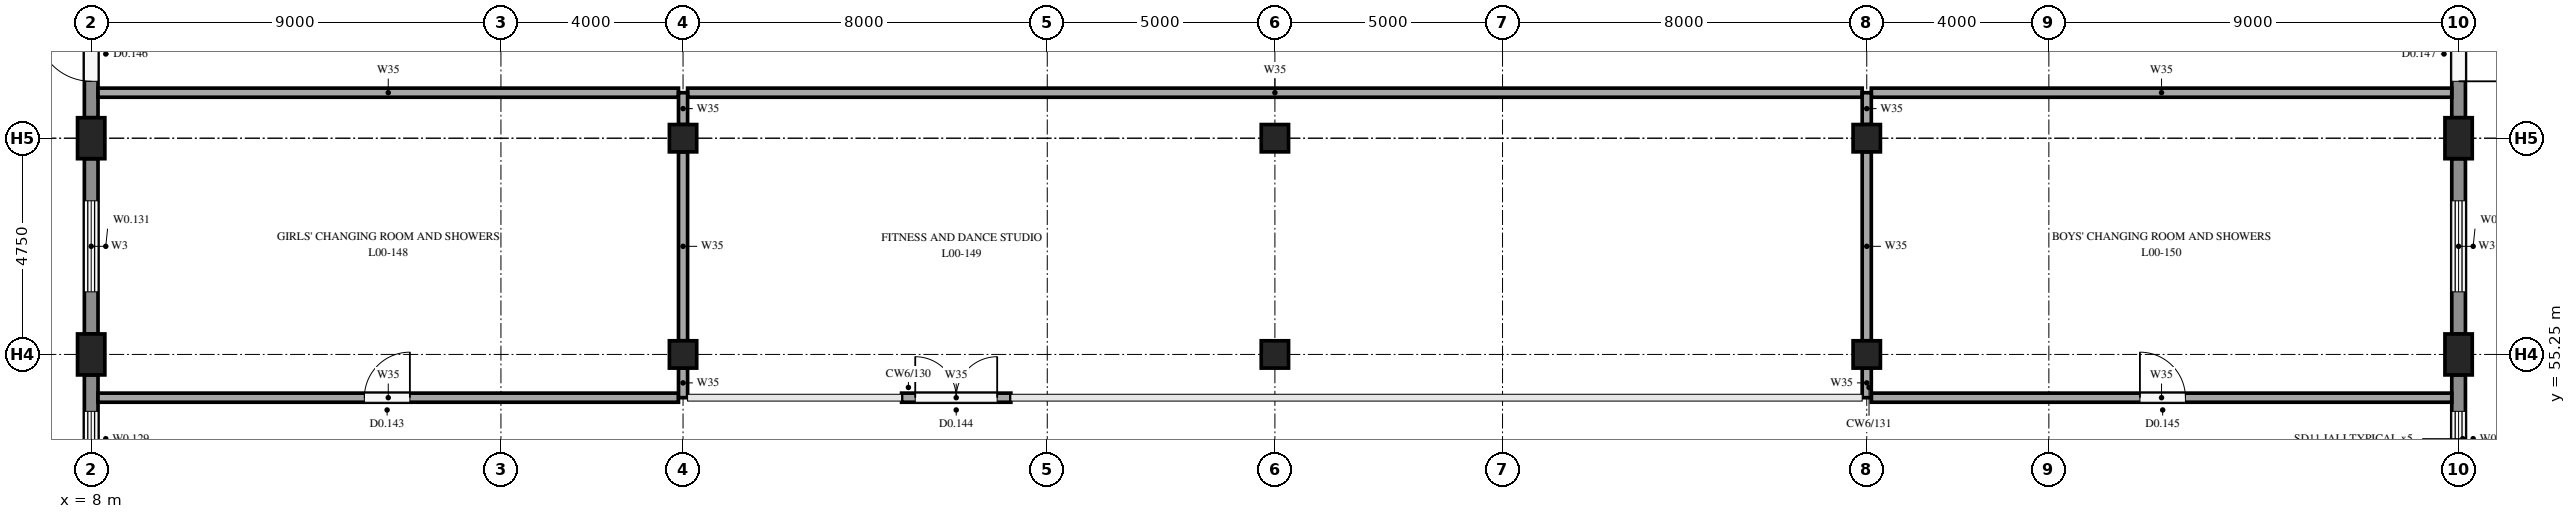
"""IFC4 building model, lengths in metres.
Left out: names, types, materials, properties, quantities, classifications, styles, units other than length and angle.
Written with IfcOpenShell. Run it as: python <this file> out.ifc"""

import sys

from ifc_helpers import new_model, si_unit, direction, frame, frame_2d, origin, origin_2d, place, context, subcontext, project, spatial, rectangle, extrude, element, fill, save


model = new_model("IFC4")
c1 = context("Model", 3, precision=1e-05, world=origin(), true_north=direction((0.0, 1.0)))
c2 = subcontext(c1, "Body", "Model", "MODEL_VIEW")
j1 = project(units=[si_unit("LENGTHUNIT", "METRE"), si_unit("PLANEANGLEUNIT", "RADIAN")], contexts=[c1])
p1 = place(None, origin())
s1 = spatial("IfcSite", under=j1, at=p1, CompositionType="ELEMENT")
p2 = place(p1, origin())
s2 = spatial("IfcBuilding", under=s1, at=p2, CompositionType="ELEMENT")
p3 = place(p2, origin())
s3 = spatial("IfcBuildingStorey", under=s2, at=p3, CompositionType="ELEMENT", Elevation=0.0)
for number, where, z_axis, x_axis in (
    (1, (8.0, 55.25, 0.0), (0.0, 0.0, 1.0), (1.0, 0.0, 0.0)),
    (2, (8.0, 60.0, 0.0), (0.0, 0.0, 1.0), (1.0, 0.0, 0.0)),
    (3, (60.0, 55.25, 0.0), (0.0, 0.0, 1.0), (1.0, 0.0, 0.0)),
    (4, (60.0, 60.0, 0.0), (0.0, 0.0, 1.0), (1.0, 0.0, 0.0)),
):
    element("IfcColumn", number, at=place(p3, frame(where, z_axis=z_axis, x_axis=x_axis)), inside=s3, PredefinedType="COLUMN", context=c2, shape_type="SweptSolid", body=[
        extrude(rectangle(XDim=0.6, YDim=0.9, at=origin_2d()), origin(), (0.0, 0.0, 1.0), 4.5),
    ])
for number, where, z_axis, x_axis in (
    (5, (21.0, 55.25, 0.0), (0.0, 0.0, 1.0), (1.0, 0.0, 0.0)),
    (6, (21.0, 60.0, 0.0), (0.0, 0.0, 1.0), (1.0, 0.0, 0.0)),
    (7, (34.0, 55.25, 0.0), (0.0, 0.0, 1.0), (1.0, 0.0, 0.0)),
    (8, (34.0, 60.0, 0.0), (0.0, 0.0, 1.0), (1.0, 0.0, 0.0)),
    (9, (47.0, 55.25, 0.0), (0.0, 0.0, 1.0), (1.0, 0.0, 0.0)),
    (10, (47.0, 60.0, 0.0), (0.0, 0.0, 1.0), (1.0, 0.0, 0.0)),
):
    element("IfcColumn", number, at=place(p3, frame(where, z_axis=z_axis, x_axis=x_axis)), inside=s3, PredefinedType="COLUMN", context=c2, shape_type="SweptSolid", body=[
        extrude(rectangle(XDim=0.6, YDim=0.6, at=origin_2d()), origin(), (0.0, 0.0, 1.0), 4.5),
    ])
p4 = place(p3, frame((8.0, 50.95, 0.0), z_axis=(0.0, 0.0, 1.0), x_axis=(0.0, 1.0, 0.0)))
e11 = element("IfcWall", 11, at=p4, inside=s3, PredefinedType="SOLIDWALL", context=c2, shape_type="SweptSolid", body=[
    extrude(rectangle(XDim=3.85, YDim=0.3, at=frame_2d((1.925, 0.0))), origin(), (0.0, 0.0, 1.0), 4.15),
])
p5 = place(p4, frame((1.85, 0.0, 1.0)))
e12 = element("IfcOpeningElement", 12, at=p5, cuts=e11, PredefinedType="OPENING", context=c2, shape_type="SweptSolid", body=[
    extrude(rectangle(XDim=1.2, YDim=2.0, at=frame_2d((0.6, 1.0))), frame((0.0, 0.16, 0.0), z_axis=(0.0, -1.0, 0.0), x_axis=(1.0, 0.0, 0.0)), (0.0, 0.0, 1.0), 0.32),
])
p6 = place(p4, frame((0.45, 0.0, 0.0)))
e13 = element("IfcOpeningElement", 13, at=p6, cuts=e11, PredefinedType="OPENING", context=c2, shape_type="SweptSolid", body=[
    extrude(rectangle(XDim=1.2, YDim=2.1, at=frame_2d((0.6, 1.05))), frame((0.0, 0.16, 0.0), z_axis=(0.0, -1.0, 0.0), x_axis=(1.0, 0.0, 0.0)), (0.0, 0.0, 1.0), 0.32),
])
p7 = place(p3, frame((8.0, 55.7, 0.0), z_axis=(0.0, 0.0, 1.0), x_axis=(0.0, 1.0, 0.0)))
e14 = element("IfcWall", 14, at=p7, inside=s3, PredefinedType="SOLIDWALL", context=c2, shape_type="SweptSolid", body=[
    extrude(rectangle(XDim=3.85, YDim=0.3, at=frame_2d((1.925, 0.0))), origin(), (0.0, 0.0, 1.0), 4.15),
])
p8 = place(p7, frame((0.925, 0.0, 1.0)))
e15 = element("IfcOpeningElement", 15, at=p8, cuts=e14, PredefinedType="OPENING", context=c2, shape_type="SweptSolid", body=[
    extrude(rectangle(XDim=2.0, YDim=2.0, at=frame_2d((1.0, 1.0))), frame((0.0, 0.16, 0.0), z_axis=(0.0, -1.0, 0.0), x_axis=(1.0, 0.0, 0.0)), (0.0, 0.0, 1.0), 0.32),
])
p9 = place(p3, frame((8.0, 60.45, 0.0), z_axis=(0.0, 0.0, 1.0), x_axis=(0.0, 1.0, 0.0)))
e16 = element("IfcWall", 16, at=p9, inside=s3, PredefinedType="SOLIDWALL", context=c2, shape_type="SweptSolid", body=[
    extrude(rectangle(XDim=3.85, YDim=0.3, at=frame_2d((1.925, 0.0))), origin(), (0.0, 0.0, 1.0), 4.15),
])
p10 = place(p9, frame((2.1, 0.0, 1.0)))
e17 = element("IfcOpeningElement", 17, at=p10, cuts=e16, PredefinedType="OPENING", context=c2, shape_type="SweptSolid", body=[
    extrude(rectangle(XDim=1.2, YDim=2.0, at=frame_2d((0.6, 1.0))), frame((0.0, 0.16, 0.0), z_axis=(0.0, -1.0, 0.0), x_axis=(1.0, 0.0, 0.0)), (0.0, 0.0, 1.0), 0.32),
])
p11 = place(p9, frame((0.8, 0.0, 0.0)))
e18 = element("IfcOpeningElement", 18, at=p11, cuts=e16, PredefinedType="OPENING", context=c2, shape_type="SweptSolid", body=[
    extrude(rectangle(XDim=1.2, YDim=2.1, at=frame_2d((0.6, 1.05))), frame((0.0, 0.16, 0.0), z_axis=(0.0, -1.0, 0.0), x_axis=(1.0, 0.0, 0.0)), (0.0, 0.0, 1.0), 0.32),
])
p12 = place(p3, frame((60.0, 50.95, 0.0), z_axis=(0.0, 0.0, 1.0), x_axis=(0.0, 1.0, 0.0)))
e19 = element("IfcWall", 19, at=p12, inside=s3, PredefinedType="SOLIDWALL", context=c2, shape_type="SweptSolid", body=[
    extrude(rectangle(XDim=3.85, YDim=0.3, at=frame_2d((1.925, 0.0))), origin(), (0.0, 0.0, 1.0), 4.15),
])
p13 = place(p12, frame((1.85, 0.0, 1.0)))
e20 = element("IfcOpeningElement", 20, at=p13, cuts=e19, PredefinedType="OPENING", context=c2, shape_type="SweptSolid", body=[
    extrude(rectangle(XDim=1.2, YDim=2.0, at=frame_2d((0.6, 1.0))), frame((0.0, 0.16, 0.0), z_axis=(0.0, -1.0, 0.0), x_axis=(1.0, 0.0, 0.0)), (0.0, 0.0, 1.0), 0.32),
])
p14 = place(p12, frame((0.45, 0.0, 0.0)))
e21 = element("IfcOpeningElement", 21, at=p14, cuts=e19, PredefinedType="OPENING", context=c2, shape_type="SweptSolid", body=[
    extrude(rectangle(XDim=1.2, YDim=2.1, at=frame_2d((0.6, 1.05))), frame((0.0, 0.16, 0.0), z_axis=(0.0, -1.0, 0.0), x_axis=(1.0, 0.0, 0.0)), (0.0, 0.0, 1.0), 0.32),
])
p15 = place(p3, frame((60.0, 55.7, 0.0), z_axis=(0.0, 0.0, 1.0), x_axis=(0.0, 1.0, 0.0)))
e22 = element("IfcWall", 22, at=p15, inside=s3, PredefinedType="SOLIDWALL", context=c2, shape_type="SweptSolid", body=[
    extrude(rectangle(XDim=3.85, YDim=0.3, at=frame_2d((1.925, 0.0))), origin(), (0.0, 0.0, 1.0), 4.15),
])
p16 = place(p15, frame((0.925, 0.0, 1.0)))
e23 = element("IfcOpeningElement", 23, at=p16, cuts=e22, PredefinedType="OPENING", context=c2, shape_type="SweptSolid", body=[
    extrude(rectangle(XDim=2.0, YDim=2.0, at=frame_2d((1.0, 1.0))), frame((0.0, 0.16, 0.0), z_axis=(0.0, -1.0, 0.0), x_axis=(1.0, 0.0, 0.0)), (0.0, 0.0, 1.0), 0.32),
])
p17 = place(p3, frame((60.0, 60.45, 0.0), z_axis=(0.0, 0.0, 1.0), x_axis=(0.0, 1.0, 0.0)))
e24 = element("IfcWall", 24, at=p17, inside=s3, PredefinedType="SOLIDWALL", context=c2, shape_type="SweptSolid", body=[
    extrude(rectangle(XDim=3.85, YDim=0.3, at=frame_2d((1.925, 0.0))), origin(), (0.0, 0.0, 1.0), 4.15),
])
p18 = place(p17, frame((2.1, 0.0, 1.0)))
e25 = element("IfcOpeningElement", 25, at=p18, cuts=e24, PredefinedType="OPENING", context=c2, shape_type="SweptSolid", body=[
    extrude(rectangle(XDim=1.2, YDim=2.0, at=frame_2d((0.6, 1.0))), frame((0.0, 0.16, 0.0), z_axis=(0.0, -1.0, 0.0), x_axis=(1.0, 0.0, 0.0)), (0.0, 0.0, 1.0), 0.32),
])
p19 = place(p17, frame((0.8, 0.0, 0.0)))
e26 = element("IfcOpeningElement", 26, at=p19, cuts=e24, PredefinedType="OPENING", context=c2, shape_type="SweptSolid", body=[
    extrude(rectangle(XDim=1.2, YDim=2.1, at=frame_2d((0.6, 1.05))), frame((0.0, 0.16, 0.0), z_axis=(0.0, -1.0, 0.0), x_axis=(1.0, 0.0, 0.0)), (0.0, 0.0, 1.0), 0.32),
])
p20 = place(p3, frame((8.15, 54.3, 0.0), z_axis=(0.0, 0.0, 1.0), x_axis=(1.0, 0.0, 0.0)))
e27 = element("IfcWall", 27, at=p20, inside=s3, PredefinedType="PARTITIONING", context=c2, shape_type="SweptSolid", body=[
    extrude(rectangle(XDim=12.75, YDim=0.2, at=frame_2d((6.375, 0.0))), origin(), (0.0, 0.0, 1.0), 4.15),
])
p21 = place(p20, frame((5.85, 0.0, 0.0)))
e28 = element("IfcOpeningElement", 28, at=p21, cuts=e27, PredefinedType="OPENING", context=c2, shape_type="SweptSolid", body=[
    extrude(rectangle(XDim=1.0, YDim=2.1, at=frame_2d((0.5, 1.05))), frame((0.0, 0.11, 0.0), z_axis=(0.0, -1.0, 0.0), x_axis=(1.0, 0.0, 0.0)), (0.0, 0.0, 1.0), 0.22),
])
p22 = place(p3, frame((25.8, 54.3, 0.0), z_axis=(0.0, 0.0, 1.0), x_axis=(1.0, 0.0, 0.0)))
e29 = element("IfcWall", 29, at=p22, inside=s3, PredefinedType="PARTITIONING", context=c2, shape_type="SweptSolid", body=[
    extrude(rectangle(XDim=2.4, YDim=0.2, at=frame_2d((1.2, 0.0))), origin(), (0.0, 0.0, 1.0), 4.15),
])
p23 = place(p22, frame((0.3, 0.0, 0.0)))
e30 = element("IfcOpeningElement", 30, at=p23, cuts=e29, PredefinedType="OPENING", context=c2, shape_type="SweptSolid", body=[
    extrude(rectangle(XDim=1.8, YDim=2.1, at=frame_2d((0.9, 1.05))), frame((0.0, 0.11, 0.0), z_axis=(0.0, -1.0, 0.0), x_axis=(1.0, 0.0, 0.0)), (0.0, 0.0, 1.0), 0.22),
])
p24 = place(p3, frame((47.1, 54.3, 0.0), z_axis=(0.0, 0.0, 1.0), x_axis=(1.0, 0.0, 0.0)))
e31 = element("IfcWall", 31, at=p24, inside=s3, PredefinedType="PARTITIONING", context=c2, shape_type="SweptSolid", body=[
    extrude(rectangle(XDim=12.75, YDim=0.2, at=frame_2d((6.375, 0.0))), origin(), (0.0, 0.0, 1.0), 4.15),
])
p25 = place(p24, frame((5.9, 0.0, 0.0)))
e32 = element("IfcOpeningElement", 32, at=p25, cuts=e31, PredefinedType="OPENING", context=c2, shape_type="SweptSolid", body=[
    extrude(rectangle(XDim=1.0, YDim=2.1, at=frame_2d((0.5, 1.05))), frame((0.0, 0.11, 0.0), z_axis=(0.0, -1.0, 0.0), x_axis=(1.0, 0.0, 0.0)), (0.0, 0.0, 1.0), 0.22),
])
p26 = place(p3, frame((8.15, 61.0, 0.0), z_axis=(0.0, 0.0, 1.0), x_axis=(1.0, 0.0, 0.0)))
e33 = element("IfcWall", 33, at=p26, inside=s3, PredefinedType="PARTITIONING", context=c2, shape_type="SweptSolid", body=[
    extrude(rectangle(XDim=12.75, YDim=0.2, at=frame_2d((6.375, 0.0))), origin(), (0.0, 0.0, 1.0), 4.15),
])
p27 = place(p3, frame((21.1, 61.0, 0.0), z_axis=(0.0, 0.0, 1.0), x_axis=(1.0, 0.0, 0.0)))
e34 = element("IfcWall", 34, at=p27, inside=s3, PredefinedType="PARTITIONING", context=c2, shape_type="SweptSolid", body=[
    extrude(rectangle(XDim=25.8, YDim=0.2, at=frame_2d((12.9, 0.0))), origin(), (0.0, 0.0, 1.0), 4.15),
])
p28 = place(p3, frame((47.1, 61.0, 0.0), z_axis=(0.0, 0.0, 1.0), x_axis=(1.0, 0.0, 0.0)))
e35 = element("IfcWall", 35, at=p28, inside=s3, PredefinedType="PARTITIONING", context=c2, shape_type="SweptSolid", body=[
    extrude(rectangle(XDim=12.75, YDim=0.2, at=frame_2d((6.375, 0.0))), origin(), (0.0, 0.0, 1.0), 4.15),
])
p29 = place(p3, frame((21.0, 54.3, 0.0), z_axis=(0.0, 0.0, 1.0), x_axis=(0.0, 1.0, 0.0)))
e36 = element("IfcWall", 36, at=p29, inside=s3, PredefinedType="PARTITIONING", context=c2, shape_type="SweptSolid", body=[
    extrude(rectangle(XDim=0.65, YDim=0.2, at=frame_2d((0.325, 0.0))), origin(), (0.0, 0.0, 1.0), 4.15),
])
p30 = place(p3, frame((21.0, 55.55, 0.0), z_axis=(0.0, 0.0, 1.0), x_axis=(0.0, 1.0, 0.0)))
e37 = element("IfcWall", 37, at=p30, inside=s3, PredefinedType="PARTITIONING", context=c2, shape_type="SweptSolid", body=[
    extrude(rectangle(XDim=4.15, YDim=0.2, at=frame_2d((2.075, 0.0))), origin(), (0.0, 0.0, 1.0), 4.15),
])
p31 = place(p3, frame((21.0, 60.3, 0.0), z_axis=(0.0, 0.0, 1.0), x_axis=(0.0, 1.0, 0.0)))
e38 = element("IfcWall", 38, at=p31, inside=s3, PredefinedType="PARTITIONING", context=c2, shape_type="SweptSolid", body=[
    extrude(rectangle(XDim=0.7, YDim=0.2, at=frame_2d((0.35, 0.0))), origin(), (0.0, 0.0, 1.0), 4.15),
])
p32 = place(p3, frame((47.0, 54.3, 0.0), z_axis=(0.0, 0.0, 1.0), x_axis=(0.0, 1.0, 0.0)))
e39 = element("IfcWall", 39, at=p32, inside=s3, PredefinedType="PARTITIONING", context=c2, shape_type="SweptSolid", body=[
    extrude(rectangle(XDim=0.65, YDim=0.2, at=frame_2d((0.325, 0.0))), origin(), (0.0, 0.0, 1.0), 4.15),
])
p33 = place(p3, frame((47.0, 55.55, 0.0), z_axis=(0.0, 0.0, 1.0), x_axis=(0.0, 1.0, 0.0)))
e40 = element("IfcWall", 40, at=p33, inside=s3, PredefinedType="PARTITIONING", context=c2, shape_type="SweptSolid", body=[
    extrude(rectangle(XDim=4.15, YDim=0.2, at=frame_2d((2.075, 0.0))), origin(), (0.0, 0.0, 1.0), 4.15),
])
p34 = place(p3, frame((47.0, 60.3, 0.0), z_axis=(0.0, 0.0, 1.0), x_axis=(0.0, 1.0, 0.0)))
e41 = element("IfcWall", 41, at=p34, inside=s3, PredefinedType="PARTITIONING", context=c2, shape_type="SweptSolid", body=[
    extrude(rectangle(XDim=0.7, YDim=0.2, at=frame_2d((0.35, 0.0))), origin(), (0.0, 0.0, 1.0), 4.15),
])
p35 = place(p5, origin())
e42 = element("IfcWindow", 42, at=p35, inside=s3, PartitioningType="SINGLE_PANEL", PredefinedType="WINDOW", context=c2, shape_type="SweptSolid", body=[
    extrude(rectangle(XDim=1.2, YDim=2.0, at=frame_2d((0.6, 1.0))), frame((0.0, 0.03, 0.0), z_axis=(0.0, -1.0, 0.0), x_axis=(1.0, 0.0, 0.0)), (0.0, 0.0, 1.0), 0.06),
])
fill(e12, e42)
p36 = place(p8, origin())
e43 = element("IfcWindow", 43, at=p36, inside=s3, PartitioningType="SINGLE_PANEL", PredefinedType="WINDOW", context=c2, shape_type="SweptSolid", body=[
    extrude(rectangle(XDim=2.0, YDim=2.0, at=frame_2d((1.0, 1.0))), frame((0.0, 0.03, 0.0), z_axis=(0.0, -1.0, 0.0), x_axis=(1.0, 0.0, 0.0)), (0.0, 0.0, 1.0), 0.06),
])
fill(e15, e43)
p37 = place(p13, origin())
e44 = element("IfcWindow", 44, at=p37, inside=s3, PartitioningType="SINGLE_PANEL", PredefinedType="WINDOW", context=c2, shape_type="SweptSolid", body=[
    extrude(rectangle(XDim=1.2, YDim=2.0, at=frame_2d((0.6, 1.0))), frame((0.0, 0.03, 0.0), z_axis=(0.0, -1.0, 0.0), x_axis=(1.0, 0.0, 0.0)), (0.0, 0.0, 1.0), 0.06),
])
fill(e20, e44)
p38 = place(p16, origin())
e45 = element("IfcWindow", 45, at=p38, inside=s3, PartitioningType="SINGLE_PANEL", PredefinedType="WINDOW", context=c2, shape_type="SweptSolid", body=[
    extrude(rectangle(XDim=2.0, YDim=2.0, at=frame_2d((1.0, 1.0))), frame((0.0, 0.03, 0.0), z_axis=(0.0, -1.0, 0.0), x_axis=(1.0, 0.0, 0.0)), (0.0, 0.0, 1.0), 0.06),
])
fill(e23, e45)
p39 = place(p11, origin())
e46 = element("IfcDoor", 46, at=p39, inside=s3, OperationType="SINGLE_SWING_RIGHT", PredefinedType="DOOR", context=c2, shape_type="SweptSolid", body=[
    extrude(rectangle(XDim=1.2, YDim=2.1, at=frame_2d((0.6, 1.05))), frame((0.0, 0.025, 0.0), z_axis=(0.0, -1.0, 0.0), x_axis=(1.0, 0.0, 0.0)), (0.0, 0.0, 1.0), 0.05),
])
fill(e18, e46)
p40 = place(p19, frame((1.2, 0.0, 0.0), z_axis=(0.0, 0.0, 1.0), x_axis=(-1.0, 0.0, 0.0)))
e47 = element("IfcDoor", 47, at=p40, inside=s3, OperationType="SINGLE_SWING_LEFT", PredefinedType="DOOR", context=c2, shape_type="SweptSolid", body=[
    extrude(rectangle(XDim=1.2, YDim=2.1, at=frame_2d((0.6, 1.05))), frame((0.0, 0.025, 0.0), z_axis=(0.0, -1.0, 0.0), x_axis=(1.0, 0.0, 0.0)), (0.0, 0.0, 1.0), 0.05),
])
fill(e26, e47)
p41 = place(p21, origin())
e48 = element("IfcDoor", 48, at=p41, inside=s3, OperationType="SINGLE_SWING_RIGHT", PredefinedType="DOOR", context=c2, shape_type="SweptSolid", body=[
    extrude(rectangle(XDim=1.0, YDim=2.1, at=frame_2d((0.5, 1.05))), frame((0.0, 0.025, 0.0), z_axis=(0.0, -1.0, 0.0), x_axis=(1.0, 0.0, 0.0)), (0.0, 0.0, 1.0), 0.05),
])
fill(e28, e48)
p42 = place(p23, origin())
e49 = element("IfcDoor", 49, at=p42, inside=s3, OperationType="DOUBLE_DOOR_SINGLE_SWING", PredefinedType="DOOR", context=c2, shape_type="SweptSolid", body=[
    extrude(rectangle(XDim=1.8, YDim=2.1, at=frame_2d((0.9, 1.05))), frame((0.0, 0.025, 0.0), z_axis=(0.0, -1.0, 0.0), x_axis=(1.0, 0.0, 0.0)), (0.0, 0.0, 1.0), 0.05),
])
fill(e30, e49)
p43 = place(p25, origin())
e50 = element("IfcDoor", 50, at=p43, inside=s3, OperationType="SINGLE_SWING_LEFT", PredefinedType="DOOR", context=c2, shape_type="SweptSolid", body=[
    extrude(rectangle(XDim=1.0, YDim=2.1, at=frame_2d((0.5, 1.05))), frame((0.0, 0.025, 0.0), z_axis=(0.0, -1.0, 0.0), x_axis=(1.0, 0.0, 0.0)), (0.0, 0.0, 1.0), 0.05),
])
fill(e32, e50)
save(model, sys.argv[1])
